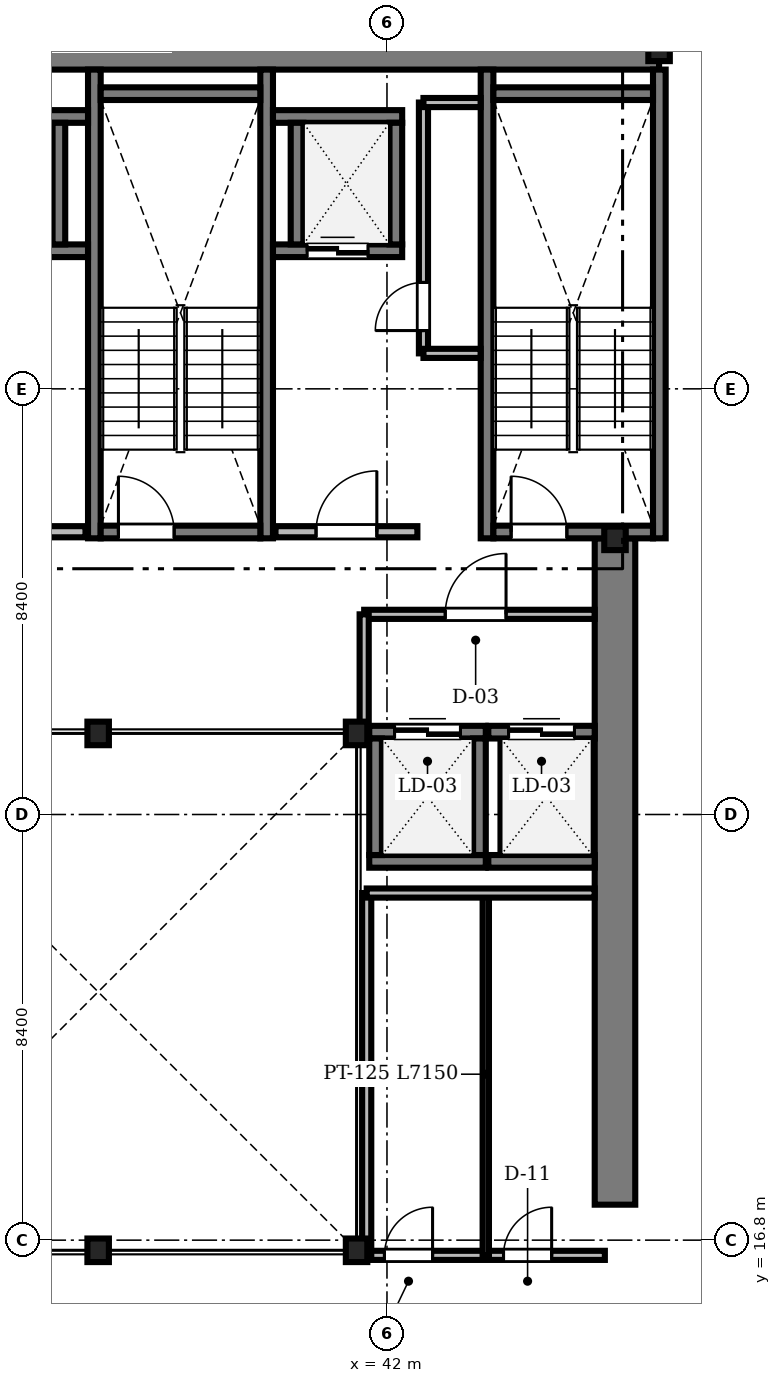
"""IFC4 building model, lengths in metres.
Left out: names, types, materials, properties, quantities, classifications, styles, units other than length and angle.
Written with IfcOpenShell. Run it as: python <this file> out.ifc"""

import sys

from ifc_helpers import new_model, si_unit, direction, frame, frame_2d, origin, origin_2d, place, context, subcontext, project, spatial, rectangle, i_section, extrude, source, transform, mapped, element, fill, save


model = new_model("IFC4")
c1 = context("Model", 3, precision=1e-05, world=origin(), true_north=direction((0.0, 1.0)))
c2 = subcontext(c1, "Body", "Model", "MODEL_VIEW")
j1 = project(units=[si_unit("LENGTHUNIT", "METRE"), si_unit("PLANEANGLEUNIT", "RADIAN")], contexts=[c1])
p1 = place(None, origin())
s1 = spatial("IfcSite", under=j1, at=p1, CompositionType="ELEMENT")
p2 = place(p1, origin())
s2 = spatial("IfcBuilding", under=s1, at=p2, CompositionType="ELEMENT")
p3 = place(p2, frame((0.0, 0.0, 133.5)))
s3 = spatial("IfcBuildingStorey", under=s2, at=p3, CompositionType="ELEMENT", Elevation=133.5)
m1 = source(origin(), c2, "Body", "SweptSolid", [
    extrude(rectangle(XDim=17.52, YDim=0.8, at=frame_2d((8.76, 0.0))), origin(), (0.0, 0.0, 1.0), 3.46),
])
p4 = place(p3, frame((29.85, 40.3, 0.0), z_axis=(0.0, 0.0, 1.0), x_axis=(1.0, 0.0, 0.0)))
e1 = element("IfcWall", 1, at=p4, inside=s3, PredefinedType="SHEAR", context=c2, shape_type="MappedRepresentation", body=[
    mapped(m1, transform((0.0, 0.0, 0.0), scale=1.0)),
])
m2 = source(origin(), c2, "Body", "SweptSolid", [
    extrude(rectangle(XDim=13.15, YDim=0.8, at=frame_2d((6.575, 0.0))), origin(), (0.0, 0.0, 1.0), 3.46),
])
p5 = place(p3, frame((46.5, 17.5, 0.0), z_axis=(0.0, 0.0, 1.0), x_axis=(0.0, 1.0, 0.0)))
e2 = element("IfcWall", 2, at=p5, inside=s3, PredefinedType="SHEAR", context=c2, shape_type="MappedRepresentation", body=[
    mapped(m2, transform((0.0, 0.0, 0.0), scale=1.0)),
])
m3 = source(origin(), c2, "Body", "SweptSolid", [
    extrude(i_section(OverallWidth=0.424, OverallDepth=0.465, WebThickness=0.035, FlangeThickness=0.056, FilletRadius=0.015, at=origin_2d()), origin(), (0.0, 0.0, 1.0), 3.46),
])
for number, where, z_axis, x_axis in (
    (3, (36.3, 16.6, 0.0), (0.0, 0.0, 1.0), (1.0, 0.0, 0.0)),
    (4, (41.4, 16.6, 0.0), (0.0, 0.0, 1.0), (1.0, 0.0, 0.0)),
    (5, (41.4, 26.8, 0.0), (0.0, 0.0, 1.0), (1.0, 0.0, 0.0)),
    (6, (36.3, 26.8, 0.0), (0.0, 0.0, 1.0), (1.0, 0.0, 0.0)),
    (7, (46.5, 30.65, 0.0), (0.0, 0.0, 1.0), (1.0, 0.0, 0.0)),
    (8, (47.37, 40.3, 0.0), (0.0, 0.0, 1.0), (1.0, 0.0, 0.0)),
):
    element("IfcColumn", number, at=place(p3, frame(where, z_axis=z_axis, x_axis=x_axis)), inside=s3, PredefinedType="COLUMN", context=c2, shape_type="MappedRepresentation", body=[
        mapped(m3, transform((0.0, 0.0, 0.0), scale=1.0)),
    ])
m4 = source(origin(), c2, "Body", "SweptSolid", [
    extrude(rectangle(XDim=9.25, YDim=0.25, at=frame_2d((4.625, 0.0))), origin(), (0.0, 0.0, 1.0), 3.5),
])
for number, where, z_axis, x_axis in (
    (9, (36.225, 30.65, 0.0), (0.0, 0.0, 1.0), (0.0, 1.0, 0.0)),
    (10, (39.625, 30.65, 0.0), (0.0, 0.0, 1.0), (0.0, 1.0, 0.0)),
):
    element("IfcWall", number, at=place(p3, frame(where, z_axis=z_axis, x_axis=x_axis)), inside=s3, PredefinedType="SOLIDWALL", context=c2, shape_type="MappedRepresentation", body=[
        mapped(m4, transform((0.0, 0.0, 0.0), scale=1.0)),
    ])
m5 = source(origin(), c2, "Body", "SweptSolid", [
    extrude(rectangle(XDim=3.15, YDim=0.25, at=frame_2d((1.575, 0.0))), origin(), (0.0, 0.0, 1.0), 3.5),
])
p6 = place(p3, frame((36.35, 39.425, 0.0), z_axis=(0.0, 0.0, 1.0), x_axis=(1.0, 0.0, 0.0)))
e11 = element("IfcWall", 11, at=p6, inside=s3, PredefinedType="SOLIDWALL", context=c2, shape_type="MappedRepresentation", body=[
    mapped(m5, transform((0.0, 0.0, 0.0), scale=1.0)),
])
p7 = place(p3, frame((36.35, 30.775, 0.0), z_axis=(0.0, 0.0, 1.0), x_axis=(1.0, 0.0, 0.0)))
e12 = element("IfcWall", 12, at=p7, inside=s3, PredefinedType="SOLIDWALL", context=c2, shape_type="MappedRepresentation", body=[
    mapped(m5, transform((0.0, 0.0, 0.0), scale=1.0)),
])
m6 = source(origin(), c2, "Body", "SweptSolid", [
    extrude(rectangle(XDim=1.1, YDim=2.2, at=frame_2d((0.55, 1.1))), frame((0.0, 0.135, 0.0), z_axis=(0.0, -1.0, 0.0), x_axis=(1.0, 0.0, 0.0)), (0.0, 0.0, 1.0), 0.27),
])
p8 = place(p7, frame((0.35, 0.0, 0.0)))
e13 = element("IfcOpeningElement", 13, at=p8, cuts=e12, PredefinedType="OPENING", context=c2, shape_type="MappedRepresentation", body=[
    mapped(m6, transform((0.0, 0.0, 0.0), scale=1.0)),
])
for number, where, z_axis, x_axis in (
    (14, (43.975, 30.65, 0.0), (0.0, 0.0, 1.0), (0.0, 1.0, 0.0)),
    (15, (47.375, 30.65, 0.0), (0.0, 0.0, 1.0), (0.0, 1.0, 0.0)),
):
    element("IfcWall", number, at=place(p3, frame(where, z_axis=z_axis, x_axis=x_axis)), inside=s3, PredefinedType="SOLIDWALL", context=c2, shape_type="MappedRepresentation", body=[
        mapped(m4, transform((0.0, 0.0, 0.0), scale=1.0)),
    ])
p9 = place(p3, frame((44.1, 39.425, 0.0), z_axis=(0.0, 0.0, 1.0), x_axis=(1.0, 0.0, 0.0)))
e16 = element("IfcWall", 16, at=p9, inside=s3, PredefinedType="SOLIDWALL", context=c2, shape_type="MappedRepresentation", body=[
    mapped(m5, transform((0.0, 0.0, 0.0), scale=1.0)),
])
p10 = place(p3, frame((44.1, 30.775, 0.0), z_axis=(0.0, 0.0, 1.0), x_axis=(1.0, 0.0, 0.0)))
e17 = element("IfcWall", 17, at=p10, inside=s3, PredefinedType="SOLIDWALL", context=c2, shape_type="MappedRepresentation", body=[
    mapped(m5, transform((0.0, 0.0, 0.0), scale=1.0)),
])
p11 = place(p10, frame((0.35, 0.0, 0.0)))
e18 = element("IfcOpeningElement", 18, at=p11, cuts=e17, PredefinedType="OPENING", context=c2, shape_type="MappedRepresentation", body=[
    mapped(m6, transform((0.0, 0.0, 0.0), scale=1.0)),
])
m7 = source(origin(), c2, "Body", "SweptSolid", [
    extrude(rectangle(XDim=3.0, YDim=0.22, at=frame_2d((1.5, 0.0))), origin(), (0.0, 0.0, 1.0), 3.46),
])
p12 = place(p3, frame((33.05, 30.78, 0.0), z_axis=(0.0, 0.0, 1.0), x_axis=(1.0, 0.0, 0.0)))
e19 = element("IfcWall", 19, at=p12, inside=s3, PredefinedType="SOLIDWALL", context=c2, shape_type="MappedRepresentation", body=[
    mapped(m7, transform((0.0, 0.0, 0.0), scale=1.0)),
])
m8 = source(origin(), c2, "Body", "SweptSolid", [
    extrude(rectangle(XDim=1.2, YDim=2.2, at=frame_2d((0.6, 1.1))), frame((0.0, 0.12, 0.0), z_axis=(0.0, -1.0, 0.0), x_axis=(1.0, 0.0, 0.0)), (0.0, 0.0, 1.0), 0.24),
])
p13 = place(p12, frame((0.9, 0.0, 0.0)))
e20 = element("IfcOpeningElement", 20, at=p13, cuts=e19, PredefinedType="OPENING", context=c2, shape_type="MappedRepresentation", body=[
    mapped(m8, transform((0.0, 0.0, 0.0), scale=1.0)),
])
m9 = source(origin(), c2, "Body", "SweptSolid", [
    extrude(rectangle(XDim=2.8, YDim=0.22, at=frame_2d((1.4, 0.0))), origin(), (0.0, 0.0, 1.0), 3.46),
])
p14 = place(p3, frame((39.8, 30.78, 0.0), z_axis=(0.0, 0.0, 1.0), x_axis=(1.0, 0.0, 0.0)))
e21 = element("IfcWall", 21, at=p14, inside=s3, PredefinedType="SOLIDWALL", context=c2, shape_type="MappedRepresentation", body=[
    mapped(m9, transform((0.0, 0.0, 0.0), scale=1.0)),
])
p15 = place(p14, frame((0.8, 0.0, 0.0)))
e22 = element("IfcOpeningElement", 22, at=p15, cuts=e21, PredefinedType="OPENING", context=c2, shape_type="MappedRepresentation", body=[
    mapped(m8, transform((0.0, 0.0, 0.0), scale=1.0)),
])
m10 = source(origin(), c2, "Body", "SweptSolid", [
    extrude(rectangle(XDim=3.1, YDim=0.25, at=frame_2d((1.55, 0.0))), origin(), (0.0, 0.0, 1.0), 3.46),
])
p16 = place(p3, frame((33.0, 36.325, 0.0), z_axis=(0.0, 0.0, 1.0), x_axis=(1.0, 0.0, 0.0)))
e23 = element("IfcWall", 23, at=p16, inside=s3, PredefinedType="SOLIDWALL", context=c2, shape_type="MappedRepresentation", body=[
    mapped(m10, transform((0.0, 0.0, 0.0), scale=1.0)),
])
m11 = source(origin(), c2, "Body", "SweptSolid", [
    extrude(rectangle(XDim=1.2, YDim=2.25, at=frame_2d((0.6, 1.125))), frame((0.0, 0.135, 0.0), z_axis=(0.0, -1.0, 0.0), x_axis=(1.0, 0.0, 0.0)), (0.0, 0.0, 1.0), 0.27),
])
p17 = place(p16, frame((0.95, 0.0, 0.0)))
e24 = element("IfcOpeningElement", 24, at=p17, cuts=e23, PredefinedType="OPENING", context=c2, shape_type="MappedRepresentation", body=[
    mapped(m11, transform((0.0, 0.0, 0.0), scale=1.0)),
])
p18 = place(p3, frame((33.0, 38.975, 0.0), z_axis=(0.0, 0.0, 1.0), x_axis=(1.0, 0.0, 0.0)))
e25 = element("IfcWall", 25, at=p18, inside=s3, PredefinedType="SOLIDWALL", context=c2, shape_type="MappedRepresentation", body=[
    mapped(m10, transform((0.0, 0.0, 0.0), scale=1.0)),
])
m12 = source(origin(), c2, "Body", "SweptSolid", [
    extrude(rectangle(XDim=2.4, YDim=0.25, at=frame_2d((1.2, 0.0))), origin(), (0.0, 0.0, 1.0), 3.46),
])
p19 = place(p3, frame((35.525, 36.45, 0.0), z_axis=(0.0, 0.0, 1.0), x_axis=(0.0, 1.0, 0.0)))
e26 = element("IfcWall", 26, at=p19, inside=s3, PredefinedType="SOLIDWALL", context=c2, shape_type="MappedRepresentation", body=[
    mapped(m12, transform((0.0, 0.0, 0.0), scale=1.0)),
])
m13 = source(origin(), c2, "Body", "SweptSolid", [
    extrude(rectangle(XDim=2.55, YDim=0.25, at=frame_2d((1.275, 0.0))), origin(), (0.0, 0.0, 1.0), 3.46),
])
p20 = place(p3, frame((39.75, 36.325, 0.0), z_axis=(0.0, 0.0, 1.0), x_axis=(1.0, 0.0, 0.0)))
e27 = element("IfcWall", 27, at=p20, inside=s3, PredefinedType="SOLIDWALL", context=c2, shape_type="MappedRepresentation", body=[
    mapped(m13, transform((0.0, 0.0, 0.0), scale=1.0)),
])
p21 = place(p20, frame((0.675, 0.0, 0.0)))
e28 = element("IfcOpeningElement", 28, at=p21, cuts=e27, PredefinedType="OPENING", context=c2, shape_type="MappedRepresentation", body=[
    mapped(m11, transform((0.0, 0.0, 0.0), scale=1.0)),
])
p22 = place(p3, frame((39.75, 38.975, 0.0), z_axis=(0.0, 0.0, 1.0), x_axis=(1.0, 0.0, 0.0)))
e29 = element("IfcWall", 29, at=p22, inside=s3, PredefinedType="SOLIDWALL", context=c2, shape_type="MappedRepresentation", body=[
    mapped(m13, transform((0.0, 0.0, 0.0), scale=1.0)),
])
for number, where, z_axis, x_axis in (
    (30, (40.225, 36.45, 0.0), (0.0, 0.0, 1.0), (0.0, 1.0, 0.0)),
    (31, (42.175, 36.45, 0.0), (0.0, 0.0, 1.0), (0.0, 1.0, 0.0)),
):
    element("IfcWall", number, at=place(p3, frame(where, z_axis=z_axis, x_axis=x_axis)), inside=s3, PredefinedType="SOLIDWALL", context=c2, shape_type="MappedRepresentation", body=[
        mapped(m12, transform((0.0, 0.0, 0.0), scale=1.0)),
    ])
m14 = source(origin(), c2, "Body", "SweptSolid", [
    extrude(rectangle(XDim=2.3, YDim=0.25, at=frame_2d((1.15, 0.0))), origin(), (0.0, 0.0, 1.0), 3.46),
])
p23 = place(p3, frame((41.65, 24.275, 0.0), z_axis=(0.0, 0.0, 1.0), x_axis=(1.0, 0.0, 0.0)))
e32 = element("IfcWall", 32, at=p23, inside=s3, PredefinedType="SOLIDWALL", context=c2, shape_type="MappedRepresentation", body=[
    mapped(m14, transform((0.0, 0.0, 0.0), scale=1.0)),
])
p24 = place(p3, frame((41.65, 26.825, 0.0), z_axis=(0.0, 0.0, 1.0), x_axis=(1.0, 0.0, 0.0)))
e33 = element("IfcWall", 33, at=p24, inside=s3, PredefinedType="SOLIDWALL", context=c2, shape_type="MappedRepresentation", body=[
    mapped(m14, transform((0.0, 0.0, 0.0), scale=1.0)),
])
m15 = source(origin(), c2, "Body", "SweptSolid", [
    extrude(rectangle(XDim=1.3, YDim=2.3, at=frame_2d((0.65, 1.15))), frame((0.0, 0.135, 0.0), z_axis=(0.0, -1.0, 0.0), x_axis=(1.0, 0.0, 0.0)), (0.0, 0.0, 1.0), 0.27),
])
p25 = place(p24, frame((0.5, 0.0, 0.0)))
e34 = element("IfcOpeningElement", 34, at=p25, cuts=e33, PredefinedType="OPENING", context=c2, shape_type="MappedRepresentation", body=[
    mapped(m15, transform((0.0, 0.0, 0.0), scale=1.0)),
])
for number, where, z_axis, x_axis in (
    (35, (41.775, 24.4, 0.0), (0.0, 0.0, 1.0), (0.0, 1.0, 0.0)),
    (36, (43.825, 24.4, 0.0), (0.0, 0.0, 1.0), (0.0, 1.0, 0.0)),
):
    element("IfcWall", number, at=place(p3, frame(where, z_axis=z_axis, x_axis=x_axis)), inside=s3, PredefinedType="SOLIDWALL", context=c2, shape_type="MappedRepresentation", body=[
        mapped(m14, transform((0.0, 0.0, 0.0), scale=1.0)),
    ])
m16 = source(origin(), c2, "Body", "SweptSolid", [
    extrude(rectangle(XDim=2.1, YDim=0.25, at=frame_2d((1.05, 0.0))), origin(), (0.0, 0.0, 1.0), 3.46),
])
p26 = place(p3, frame((44.0, 24.275, 0.0), z_axis=(0.0, 0.0, 1.0), x_axis=(1.0, 0.0, 0.0)))
e37 = element("IfcWall", 37, at=p26, inside=s3, PredefinedType="SOLIDWALL", context=c2, shape_type="MappedRepresentation", body=[
    mapped(m16, transform((0.0, 0.0, 0.0), scale=1.0)),
])
p27 = place(p3, frame((44.0, 26.825, 0.0), z_axis=(0.0, 0.0, 1.0), x_axis=(1.0, 0.0, 0.0)))
e38 = element("IfcWall", 38, at=p27, inside=s3, PredefinedType="SOLIDWALL", context=c2, shape_type="MappedRepresentation", body=[
    mapped(m16, transform((0.0, 0.0, 0.0), scale=1.0)),
])
p28 = place(p27, frame((0.4, 0.0, 0.0)))
e39 = element("IfcOpeningElement", 39, at=p28, cuts=e38, PredefinedType="OPENING", context=c2, shape_type="MappedRepresentation", body=[
    mapped(m15, transform((0.0, 0.0, 0.0), scale=1.0)),
])
m17 = source(origin(), c2, "Body", "SweptSolid", [
    extrude(rectangle(XDim=4.95, YDim=0.18, at=frame_2d((2.475, 0.0))), origin(), (0.0, 0.0, 1.0), 3.46),
])
p29 = place(p3, frame((42.72, 34.3, 0.0), z_axis=(0.0, 0.0, 1.0), x_axis=(0.0, 1.0, 0.0)))
e40 = element("IfcWall", 40, at=p29, inside=s3, PredefinedType="PARTITIONING", context=c2, shape_type="MappedRepresentation", body=[
    mapped(m17, transform((0.0, 0.0, 0.0), scale=1.0)),
])
m18 = source(origin(), c2, "Body", "SweptSolid", [
    extrude(rectangle(XDim=0.95, YDim=2.15, at=frame_2d((0.475, 1.075))), frame((0.0, 0.1, 0.0), z_axis=(0.0, -1.0, 0.0), x_axis=(1.0, 0.0, 0.0)), (0.0, 0.0, 1.0), 0.2),
])
p30 = place(p29, frame((0.45, 0.0, 0.0)))
e41 = element("IfcOpeningElement", 41, at=p30, cuts=e40, PredefinedType="OPENING", context=c2, shape_type="MappedRepresentation", body=[
    mapped(m18, transform((0.0, 0.0, 0.0), scale=1.0)),
])
m19 = source(origin(), c2, "Body", "SweptSolid", [
    extrude(rectangle(XDim=4.548, YDim=0.18, at=frame_2d((2.274, 0.0))), origin(), (0.0, 0.0, 1.0), 3.092),
])
p31 = place(p3, frame((41.55, 29.15, 0.0), z_axis=(0.0, 0.0, 1.0), x_axis=(1.0, 0.0, 0.0)))
e42 = element("IfcWall", 42, at=p31, inside=s3, PredefinedType="PARTITIONING", context=c2, shape_type="MappedRepresentation", body=[
    mapped(m19, transform((0.0, 0.0, 0.0), scale=1.0)),
])
m20 = source(origin(), c2, "Body", "SweptSolid", [
    extrude(rectangle(XDim=1.2, YDim=2.2, at=frame_2d((0.6, 1.1))), frame((0.0, 0.1, 0.0), z_axis=(0.0, -1.0, 0.0), x_axis=(1.0, 0.0, 0.0)), (0.0, 0.0, 1.0), 0.2),
])
p32 = place(p31, frame((1.6, 0.0, 0.0)))
e43 = element("IfcOpeningElement", 43, at=p32, cuts=e42, PredefinedType="OPENING", context=c2, shape_type="MappedRepresentation", body=[
    mapped(m20, transform((0.0, 0.0, 0.0), scale=1.0)),
])
m21 = source(origin(), c2, "Body", "SweptSolid", [
    extrude(rectangle(XDim=4.7, YDim=0.18, at=frame_2d((2.35, 0.0))), origin(), (0.0, 0.0, 1.0), 2.852),
])
p33 = place(p3, frame((41.6, 16.5, 0.0), z_axis=(0.0, 0.0, 1.0), x_axis=(1.0, 0.0, 0.0)))
e44 = element("IfcWall", 44, at=p33, inside=s3, PredefinedType="PARTITIONING", context=c2, shape_type="MappedRepresentation", body=[
    mapped(m21, transform((0.0, 0.0, 0.0), scale=1.0)),
])
p34 = place(p33, frame((0.35, 0.0, 0.0)))
e45 = element("IfcOpeningElement", 45, at=p34, cuts=e44, PredefinedType="OPENING", context=c2, shape_type="MappedRepresentation", body=[
    mapped(m18, transform((0.0, 0.0, 0.0), scale=1.0)),
])
p35 = place(p33, frame((2.7, 0.0, 0.0)))
e46 = element("IfcOpeningElement", 46, at=p35, cuts=e44, PredefinedType="OPENING", context=c2, shape_type="MappedRepresentation", body=[
    mapped(m18, transform((0.0, 0.0, 0.0), scale=1.0)),
])
m22 = source(origin(), c2, "Body", "SweptSolid", [
    extrude(rectangle(XDim=7.15, YDim=0.18, at=frame_2d((3.575, 0.0))), origin(), (0.0, 0.0, 1.0), 2.852),
])
p36 = place(p3, frame((41.6, 16.5, 0.0), z_axis=(0.0, 0.0, 1.0), x_axis=(0.0, 1.0, 0.0)))
e47 = element("IfcWall", 47, at=p36, inside=s3, PredefinedType="PARTITIONING", context=c2, shape_type="MappedRepresentation", body=[
    mapped(m22, transform((0.0, 0.0, 0.0), scale=1.0)),
])
m23 = source(origin(), c2, "Body", "SweptSolid", [
    extrude(rectangle(XDim=7.15, YDim=0.125, at=frame_2d((3.575, 0.0))), origin(), (0.0, 0.0, 1.0), 2.852),
])
p37 = place(p3, frame((43.95, 16.5, 0.0), z_axis=(0.0, 0.0, 1.0), x_axis=(0.0, 1.0, 0.0)))
e48 = element("IfcWall", 48, at=p37, inside=s3, PredefinedType="PARTITIONING", context=c2, shape_type="MappedRepresentation", body=[
    mapped(m23, transform((0.0, 0.0, 0.0), scale=1.0)),
])
m24 = source(origin(), c2, "Body", "SweptSolid", [
    extrude(rectangle(XDim=4.498, YDim=0.18, at=frame_2d((2.249, 0.0))), origin(), (0.0, 0.0, 1.0), 3.46),
])
p38 = place(p3, frame((41.6, 23.65, 0.0), z_axis=(0.0, 0.0, 1.0), x_axis=(1.0, 0.0, 0.0)))
e49 = element("IfcWall", 49, at=p38, inside=s3, PredefinedType="PARTITIONING", context=c2, shape_type="MappedRepresentation", body=[
    mapped(m24, transform((0.0, 0.0, 0.0), scale=1.0)),
])
m25 = source(origin(), c2, "Body", "SweptSolid", [
    extrude(rectangle(XDim=2.35, YDim=0.18, at=frame_2d((1.175, 0.0))), origin(), (0.0, 0.0, 1.0), 2.852),
])
p39 = place(p3, frame((41.55, 26.8, 0.0), z_axis=(0.0, 0.0, 1.0), x_axis=(0.0, 1.0, 0.0)))
e50 = element("IfcWall", 50, at=p39, inside=s3, PredefinedType="PARTITIONING", context=c2, shape_type="MappedRepresentation", body=[
    mapped(m25, transform((0.0, 0.0, 0.0), scale=1.0)),
])
m26 = source(origin(), c2, "Body", "SweptSolid", [
    extrude(rectangle(XDim=1.128, YDim=0.18, at=frame_2d((0.564, 0.0))), origin(), (0.0, 0.0, 1.0), 3.46),
])
for number, where, z_axis, x_axis in (
    (51, (42.72, 34.3, 0.0), (0.0, 0.0, 1.0), (1.0, 0.0, 0.0)),
    (52, (42.72, 39.25, 0.0), (0.0, 0.0, 1.0), (1.0, 0.0, 0.0)),
):
    element("IfcWall", number, at=place(p3, frame(where, z_axis=z_axis, x_axis=x_axis)), inside=s3, PredefinedType="PARTITIONING", context=c2, shape_type="MappedRepresentation", body=[
        mapped(m26, transform((0.0, 0.0, 0.0), scale=1.0)),
    ])
m27 = source(origin(), c2, "Body", "SweptSolid", [
    extrude(rectangle(XDim=1.1, YDim=2.2, at=frame_2d((0.55, 1.1))), frame((0.0, 0.025, 0.0), z_axis=(0.0, -1.0, 0.0), x_axis=(1.0, 0.0, 0.0)), (0.0, 0.0, 1.0), 0.05),
])
p40 = place(p8, origin())
e53 = element("IfcDoor", 53, at=p40, inside=s3, OperationType="SINGLE_SWING_LEFT", PredefinedType="DOOR", context=c2, shape_type="MappedRepresentation", body=[
    mapped(m27, transform((0.0, 0.0, 0.0), scale=1.0)),
])
fill(e13, e53)
p41 = place(p11, origin())
e54 = element("IfcDoor", 54, at=p41, inside=s3, OperationType="SINGLE_SWING_LEFT", PredefinedType="DOOR", context=c2, shape_type="MappedRepresentation", body=[
    mapped(m27, transform((0.0, 0.0, 0.0), scale=1.0)),
])
fill(e18, e54)
m28 = source(origin(), c2, "Body", "SweptSolid", [
    extrude(rectangle(XDim=1.2, YDim=2.2, at=frame_2d((0.6, 1.1))), frame((0.0, 0.025, 0.0), z_axis=(0.0, -1.0, 0.0), x_axis=(1.0, 0.0, 0.0)), (0.0, 0.0, 1.0), 0.05),
])
p42 = place(p15, origin())
e55 = element("IfcDoor", 55, at=p42, inside=s3, OperationType="SINGLE_SWING_RIGHT", PredefinedType="DOOR", context=c2, shape_type="MappedRepresentation", body=[
    mapped(m28, transform((0.0, 0.0, 0.0), scale=1.0)),
])
fill(e22, e55)
m29 = source(origin(), c2, "Body", "SweptSolid", [
    extrude(rectangle(XDim=1.2, YDim=2.25, at=frame_2d((0.6, 1.125))), frame((0.0, 0.025, 0.0), z_axis=(0.0, -1.0, 0.0), x_axis=(1.0, 0.0, 0.0)), (0.0, 0.0, 1.0), 0.05),
])
p43 = place(p21, origin())
e56 = element("IfcDoor", 56, at=p43, inside=s3, OperationType="DOUBLE_DOOR_SLIDING", PredefinedType="DOOR", context=c2, shape_type="MappedRepresentation", body=[
    mapped(m29, transform((0.0, 0.0, 0.0), scale=1.0)),
])
fill(e28, e56)
m30 = source(origin(), c2, "Body", "SweptSolid", [
    extrude(rectangle(XDim=1.3, YDim=2.3, at=frame_2d((0.65, 1.15))), frame((0.0, 0.025, 0.0), z_axis=(0.0, -1.0, 0.0), x_axis=(1.0, 0.0, 0.0)), (0.0, 0.0, 1.0), 0.05),
])
p44 = place(p25, origin())
e57 = element("IfcDoor", 57, at=p44, inside=s3, OperationType="DOUBLE_DOOR_SLIDING", PredefinedType="DOOR", context=c2, shape_type="MappedRepresentation", body=[
    mapped(m30, transform((0.0, 0.0, 0.0), scale=1.0)),
])
fill(e34, e57)
p45 = place(p28, origin())
e58 = element("IfcDoor", 58, at=p45, inside=s3, OperationType="DOUBLE_DOOR_SLIDING", PredefinedType="DOOR", context=c2, shape_type="MappedRepresentation", body=[
    mapped(m30, transform((0.0, 0.0, 0.0), scale=1.0)),
])
fill(e39, e58)
m31 = source(origin(), c2, "Body", "SweptSolid", [
    extrude(rectangle(XDim=0.95, YDim=2.15, at=frame_2d((0.475, 1.075))), frame((0.0, 0.025, 0.0), z_axis=(0.0, -1.0, 0.0), x_axis=(1.0, 0.0, 0.0)), (0.0, 0.0, 1.0), 0.05),
])
p46 = place(p30, origin())
e59 = element("IfcDoor", 59, at=p46, inside=s3, OperationType="SINGLE_SWING_LEFT", PredefinedType="DOOR", context=c2, shape_type="MappedRepresentation", body=[
    mapped(m31, transform((0.0, 0.0, 0.0), scale=1.0)),
])
fill(e41, e59)
p47 = place(p32, origin())
e60 = element("IfcDoor", 60, at=p47, inside=s3, OperationType="SINGLE_SWING_RIGHT", PredefinedType="DOOR", context=c2, shape_type="MappedRepresentation", body=[
    mapped(m28, transform((0.0, 0.0, 0.0), scale=1.0)),
])
fill(e43, e60)
p48 = place(p34, origin())
e61 = element("IfcDoor", 61, at=p48, inside=s3, OperationType="SINGLE_SWING_RIGHT", PredefinedType="DOOR", context=c2, shape_type="MappedRepresentation", body=[
    mapped(m31, transform((0.0, 0.0, 0.0), scale=1.0)),
])
fill(e45, e61)
p49 = place(p35, origin())
e62 = element("IfcDoor", 62, at=p49, inside=s3, OperationType="SINGLE_SWING_RIGHT", PredefinedType="DOOR", context=c2, shape_type="MappedRepresentation", body=[
    mapped(m31, transform((0.0, 0.0, 0.0), scale=1.0)),
])
fill(e46, e62)
save(model, sys.argv[1])
